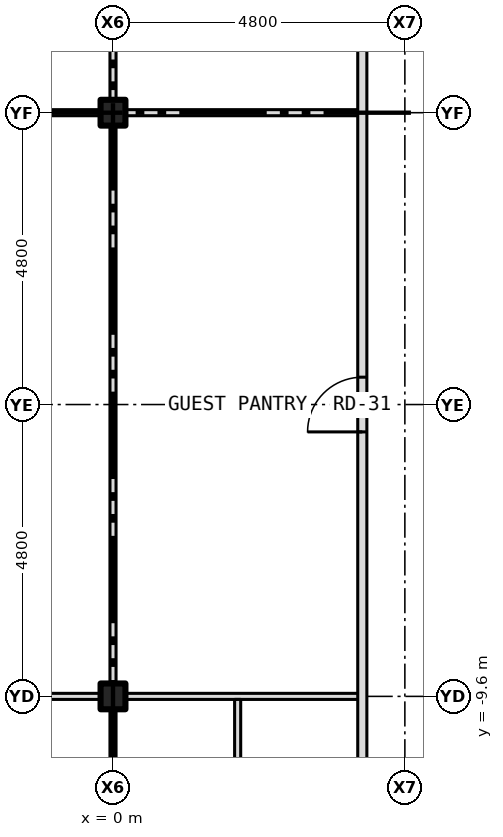
"""IFC4 building model, lengths in metres.
Left out: names, types, materials, properties, quantities, classifications, styles, units other than length and angle.
Written with IfcOpenShell. Run it as: python <this file> out.ifc"""

import sys

from ifc_helpers import new_model, si_unit, direction, frame, frame_2d, origin, origin_2d, place, context, subcontext, project, spatial, rectangle, i_section, extrude, element, fill, save


model = new_model("IFC4")
c1 = context("Model", 3, precision=1e-05, world=origin(), true_north=direction((0.0, 1.0)))
c2 = subcontext(c1, "Body", "Model", "MODEL_VIEW")
j1 = project(units=[si_unit("LENGTHUNIT", "METRE"), si_unit("PLANEANGLEUNIT", "RADIAN")], contexts=[c1])
p1 = place(None, origin())
s1 = spatial("IfcSite", under=j1, at=p1, CompositionType="ELEMENT")
p2 = place(p1, origin())
s2 = spatial("IfcBuilding", under=s1, at=p2, CompositionType="ELEMENT")
p3 = place(p2, frame((0.0, 0.0, 53.0)))
s3 = spatial("IfcBuildingStorey", under=s2, at=p3, CompositionType="ELEMENT", Elevation=53.0)
for number, where, z_axis, x_axis in (
    (1, (0.0, -9.6, -0.15), (0.0, 0.0, 1.0), (1.0, 0.0, 0.0)),
    (2, (0.0, 0.0, -0.15), (0.0, 0.0, 1.0), (1.0, 0.0, 0.0)),
):
    element("IfcColumn", number, at=place(p3, frame(where, z_axis=z_axis, x_axis=x_axis)), inside=s3, PredefinedType="COLUMN", context=c2, shape_type="SweptSolid", body=[
        extrude(i_section(OverallWidth=0.409, OverallDepth=0.424, WebThickness=0.033, FlangeThickness=0.052, at=origin_2d()), origin(), (0.0, 0.0, 1.0), 3.5),
    ])
p4 = place(p3, frame((-9.396, -9.6, 0.0), z_axis=(0.0, 0.0, 1.0), x_axis=(1.0, 0.0, 0.0)))
e3 = element("IfcWall", 3, at=p4, inside=s3, PredefinedType="PARTITIONING", context=c2, shape_type="SweptSolid", body=[
    extrude(rectangle(XDim=9.192, YDim=0.1, at=frame_2d((4.596, 0.0))), origin(), (0.0, 0.0, 1.0), 2.728),
])
p5 = place(p3, frame((-0.204, -9.6, 0.0), z_axis=(0.0, 0.0, 1.0), x_axis=(1.0, 0.0, 0.0)))
e4 = element("IfcWall", 4, at=p5, inside=s3, PredefinedType="PARTITIONING", context=c2, shape_type="SweptSolid", body=[
    extrude(rectangle(XDim=0.408, YDim=0.1, at=frame_2d((0.204, 0.0))), origin(), (0.0, 0.0, 1.0), 3.35),
])
p6 = place(p3, frame((0.204, -9.6, 0.0), z_axis=(0.0, 0.0, 1.0), x_axis=(1.0, 0.0, 0.0)))
e5 = element("IfcWall", 5, at=p6, inside=s3, PredefinedType="PARTITIONING", context=c2, shape_type="SweptSolid", body=[
    extrude(rectangle(XDim=3.896, YDim=0.1, at=frame_2d((1.948, 0.0))), origin(), (0.0, 0.0, 1.0), 2.728),
])
p7 = place(p3, frame((-9.396, 0.0, 0.0), z_axis=(0.0, 0.0, 1.0), x_axis=(1.0, 0.0, 0.0)))
e6 = element("IfcWall", 6, at=p7, inside=s3, PredefinedType="PARTITIONING", context=c2, shape_type="SweptSolid", body=[
    extrude(rectangle(XDim=9.192, YDim=0.1, at=frame_2d((4.596, 0.0))), origin(), (0.0, 0.0, 1.0), 2.728),
])
p8 = place(p3, frame((-0.204, 0.0, 0.0), z_axis=(0.0, 0.0, 1.0), x_axis=(1.0, 0.0, 0.0)))
e7 = element("IfcWall", 7, at=p8, inside=s3, PredefinedType="PARTITIONING", context=c2, shape_type="SweptSolid", body=[
    extrude(rectangle(XDim=0.408, YDim=0.1, at=frame_2d((0.204, 0.0))), origin(), (0.0, 0.0, 1.0), 3.35),
])
p9 = place(p3, frame((0.204, 0.0, 0.0), z_axis=(0.0, 0.0, 1.0), x_axis=(1.0, 0.0, 0.0)))
e8 = element("IfcWall", 8, at=p9, inside=s3, PredefinedType="PARTITIONING", context=c2, shape_type="SweptSolid", body=[
    extrude(rectangle(XDim=3.896, YDim=0.1, at=frame_2d((1.948, 0.0))), origin(), (0.0, 0.0, 1.0), 2.728),
])
p10 = place(p3, frame((0.0, -13.525, 0.0), z_axis=(0.0, 0.0, 1.0), x_axis=(0.0, 1.0, 0.0)))
e9 = element("IfcWall", 9, at=p10, inside=s3, PredefinedType="PARTITIONING", context=c2, shape_type="SweptSolid", body=[
    extrude(rectangle(XDim=3.875, YDim=0.1, at=frame_2d((1.938, 0.0))), origin(), (0.0, 0.0, 1.0), 2.728),
])
p11 = place(p3, frame((0.0, -9.55, 0.0), z_axis=(0.0, 0.0, 1.0), x_axis=(0.0, 1.0, 0.0)))
e10 = element("IfcWall", 10, at=p11, inside=s3, PredefinedType="PARTITIONING", context=c2, shape_type="SweptSolid", body=[
    extrude(rectangle(XDim=9.5, YDim=0.1, at=frame_2d((4.75, 0.0))), origin(), (0.0, 0.0, 1.0), 2.728),
])
p12 = place(p3, frame((0.0, 0.05, 0.0), z_axis=(0.0, 0.0, 1.0), x_axis=(0.0, 1.0, 0.0)))
e11 = element("IfcWall", 11, at=p12, inside=s3, PredefinedType="PARTITIONING", context=c2, shape_type="SweptSolid", body=[
    extrude(rectangle(XDim=3.975, YDim=0.1, at=frame_2d((1.987, 0.0))), origin(), (0.0, 0.0, 1.0), 2.728),
])
p13 = place(p3, frame((2.05, -13.525, 0.0), z_axis=(0.0, 0.0, 1.0), x_axis=(0.0, 1.0, 0.0)))
e12 = element("IfcWall", 12, at=p13, inside=s3, PredefinedType="PARTITIONING", context=c2, shape_type="SweptSolid", body=[
    extrude(rectangle(XDim=3.875, YDim=0.1, at=frame_2d((1.938, 0.0))), origin(), (0.0, 0.0, 1.0), 3.35),
])
p14 = place(p3, frame((4.1, -13.525, 0.0), z_axis=(0.0, 0.0, 1.0), x_axis=(0.0, 1.0, 0.0)))
e13 = element("IfcWall", 13, at=p14, inside=s3, PredefinedType="PARTITIONING", context=c2, shape_type="SweptSolid", body=[
    extrude(rectangle(XDim=17.55, YDim=0.15, at=frame_2d((8.775, 0.0))), origin(), (0.0, 0.0, 1.0), 3.35),
])
p15 = place(p14, frame((1.475, 0.0, 0.0)))
e14 = element("IfcOpeningElement", 14, at=p15, cuts=e13, PredefinedType="OPENING", context=c2, shape_type="SweptSolid", body=[
    extrude(rectangle(XDim=0.9, YDim=2.1, at=frame_2d((0.45, 1.05))), frame((0.0, 0.087, 0.0), z_axis=(0.0, -1.0, 0.0), x_axis=(1.0, 0.0, 0.0)), (0.0, 0.0, 1.0), 0.174),
])
p16 = place(p14, frame((8.275, 0.0, 0.0)))
e15 = element("IfcOpeningElement", 15, at=p16, cuts=e13, PredefinedType="OPENING", context=c2, shape_type="SweptSolid", body=[
    extrude(rectangle(XDim=0.9, YDim=2.1, at=frame_2d((0.45, 1.05))), frame((0.0, 0.087, 0.0), z_axis=(0.0, -1.0, 0.0), x_axis=(1.0, 0.0, 0.0)), (0.0, 0.0, 1.0), 0.174),
])
p17 = place(p16, origin())
e16 = element("IfcDoor", 16, at=p17, inside=s3, OperationType="SINGLE_SWING_LEFT", PredefinedType="DOOR", context=c2, shape_type="SweptSolid", body=[
    extrude(rectangle(XDim=0.9, YDim=2.1, at=frame_2d((0.45, 1.05))), frame((0.0, 0.025, 0.0), z_axis=(0.0, -1.0, 0.0), x_axis=(1.0, 0.0, 0.0)), (0.0, 0.0, 1.0), 0.05),
])
fill(e15, e16)
save(model, sys.argv[1])
